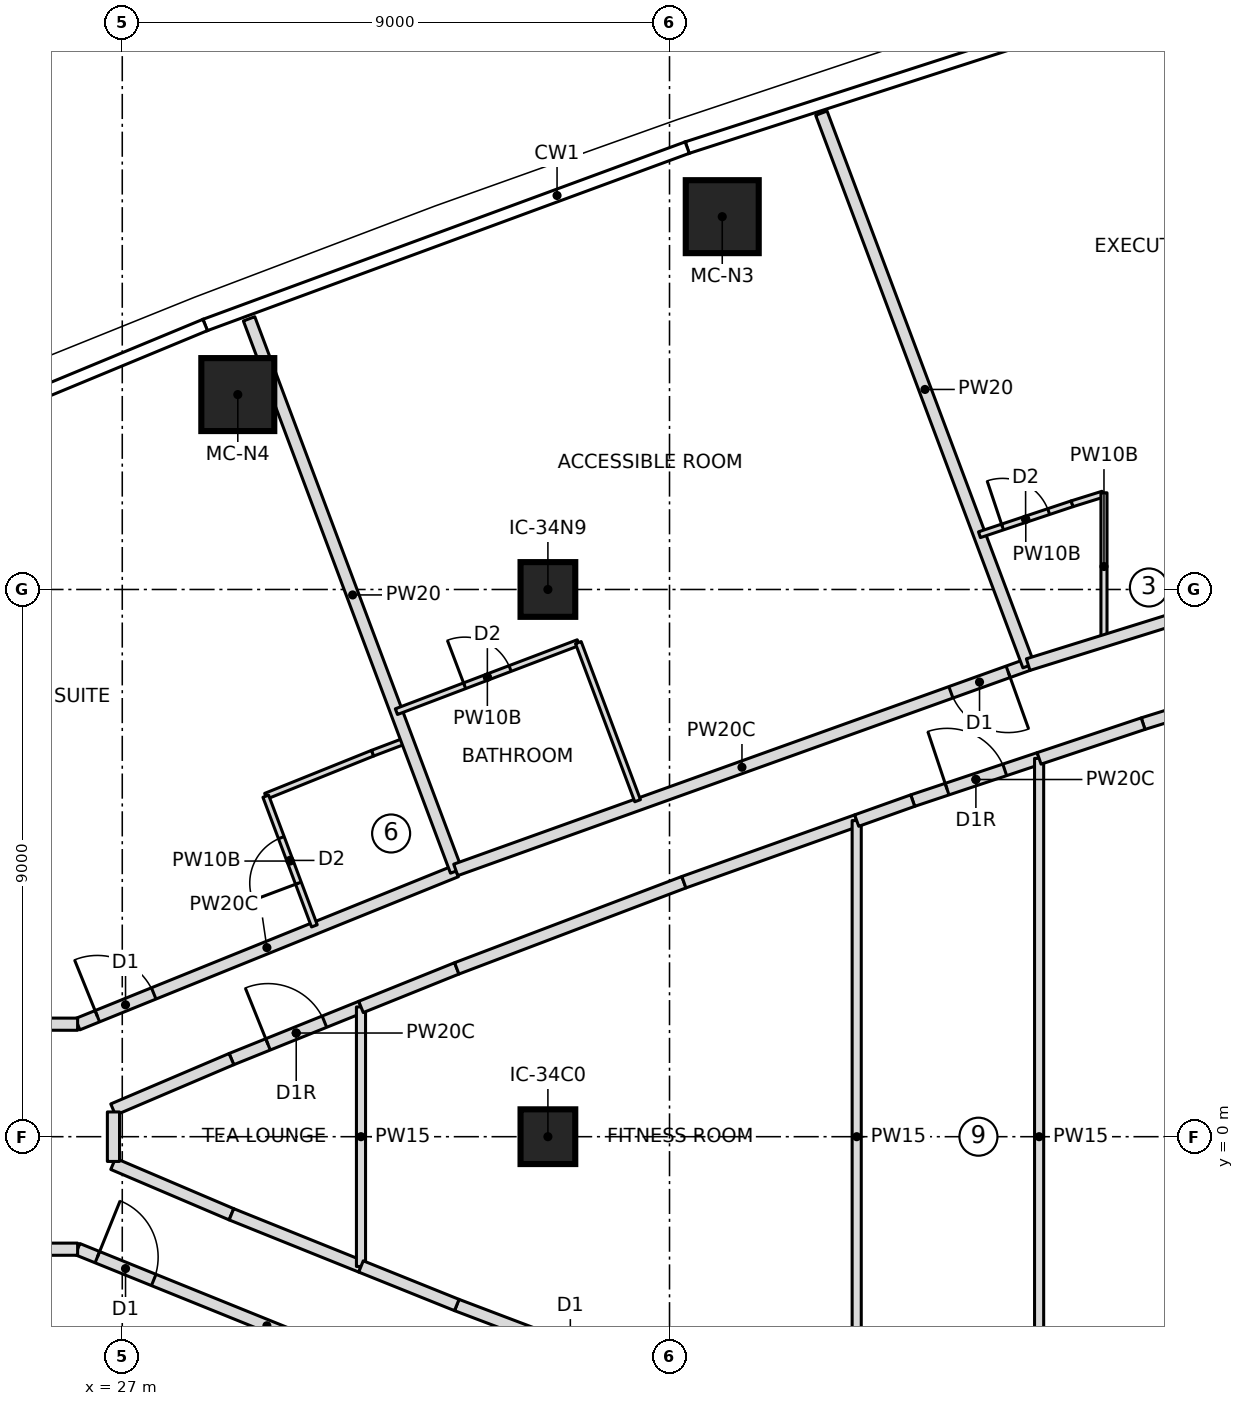
"""IFC4 building model, lengths in metres.
Left out: names, types, materials, properties, quantities, classifications, styles, units other than length and angle.
Written with IfcOpenShell. Run it as: python <this file> out.ifc"""

import sys

from ifc_helpers import new_model, si_unit, direction, frame, frame_2d, origin, origin_2d, place, context, subcontext, project, spatial, rectangle, extrude, element, fill, save


model = new_model("IFC4")
c1 = context("Model", 3, precision=1e-05, world=origin(), true_north=direction((0.0, 1.0)))
c2 = subcontext(c1, "Body", "Model", "MODEL_VIEW")
j1 = project(units=[si_unit("LENGTHUNIT", "METRE"), si_unit("PLANEANGLEUNIT", "RADIAN")], contexts=[c1])
p1 = place(None, origin())
s1 = spatial("IfcSite", under=j1, at=p1, CompositionType="ELEMENT")
p2 = place(p1, origin())
s2 = spatial("IfcBuilding", under=s1, at=p2, CompositionType="ELEMENT")
p3 = place(p2, frame((0.0, 0.0, 227.9)))
s3 = spatial("IfcBuildingStorey", under=s2, at=p3, CompositionType="ELEMENT", Elevation=227.9)
for number, where, z_axis, x_axis in (
    (1, (36.867, 15.132, 0.0), (0.0, 0.0, 1.0), (1.0, 0.0, 0.0)),
    (2, (28.9, 12.205, 0.0), (0.0, 0.0, 1.0), (1.0, 0.0, 0.0)),
):
    element("IfcColumn", number, at=place(p3, frame(where, z_axis=z_axis, x_axis=x_axis)), inside=s3, PredefinedType="COLUMN", context=c2, shape_type="SweptSolid", body=[
        extrude(rectangle(XDim=1.2, YDim=1.2, at=origin_2d()), origin(), (0.0, 0.0, 1.0), 3.55),
    ])
for number, where, z_axis, x_axis in (
    (3, (34.0, 0.0, 0.0), (0.0, 0.0, 1.0), (1.0, 0.0, 0.0)),
    (4, (34.0, 9.0, 0.0), (0.0, 0.0, 1.0), (1.0, 0.0, 0.0)),
):
    element("IfcColumn", number, at=place(p3, frame(where, z_axis=z_axis, x_axis=x_axis)), inside=s3, PredefinedType="COLUMN", context=c2, shape_type="SweptSolid", body=[
        extrude(rectangle(XDim=0.9, YDim=0.9, at=origin_2d()), origin(), (0.0, 0.0, 1.0), 3.55),
    ])
p4 = place(p3, frame((26.266, 1.85, 0.0), z_axis=(0.0, 0.0, 1.0), x_axis=(0.927007906702, 0.375041785555, 0.0)))
e5 = element("IfcWall", 5, at=p4, inside=s3, PredefinedType="PARTITIONING", context=c2, shape_type="SweptSolid", body=[
    extrude(rectangle(XDim=6.716, YDim=0.2, at=frame_2d((3.358, 0.0))), origin(), (0.0, 0.0, 1.0), 3.25),
])
p5 = place(p4, frame((0.35, 0.0, 0.0)))
e6 = element("IfcOpeningElement", 6, at=p5, cuts=e5, PredefinedType="OPENING", context=c2, shape_type="SweptSolid", body=[
    extrude(rectangle(XDim=1.0, YDim=2.1, at=frame_2d((0.5, 1.05))), frame((0.0, 0.11, 0.0), z_axis=(0.0, -1.0, 0.0), x_axis=(1.0, 0.0, 0.0)), (0.0, 0.0, 1.0), 0.22),
])
p6 = place(p3, frame((29.36, 5.6, 0.0), z_axis=(0.0, 0.0, 1.0), x_axis=(0.927594225674, 0.373589283166, 0.0)))
e7 = element("IfcWall", 7, at=p6, inside=s3, PredefinedType="PARTITIONING", context=c2, shape_type="SweptSolid", body=[
    extrude(rectangle(XDim=1.895, YDim=0.1, at=frame_2d((0.947, 0.0))), origin(), (0.0, 0.0, 1.0), 3.25),
])
p7 = place(p3, frame((31.117, 6.308, 0.0), z_axis=(0.0, 0.0, 1.0), x_axis=(0.935048188903, 0.354520640342, 0.0)))
e8 = element("IfcWall", 8, at=p7, inside=s3, PredefinedType="PARTITIONING", context=c2, shape_type="SweptSolid", body=[
    extrude(rectangle(XDim=0.606, YDim=0.1, at=frame_2d((0.303, 0.0))), origin(), (0.0, 0.0, 1.0), 3.25),
])
p8 = place(p3, frame((30.16, 3.467, 0.0), z_axis=(0.0, 0.0, 1.0), x_axis=(-0.351158682313, 0.936315961541, 0.0)))
e9 = element("IfcWall", 9, at=p8, inside=s3, PredefinedType="PARTITIONING", context=c2, shape_type="SweptSolid", body=[
    extrude(rectangle(XDim=2.278, YDim=0.1, at=frame_2d((1.139, 0.0))), origin(), (0.0, 0.0, 1.0), 3.25),
])
p9 = place(p8, frame((0.75, 0.0, 0.0)))
e10 = element("IfcOpeningElement", 10, at=p9, cuts=e9, PredefinedType="OPENING", context=c2, shape_type="SweptSolid", body=[
    extrude(rectangle(XDim=0.8, YDim=2.1, at=frame_2d((0.4, 1.05))), frame((0.0, 0.06, 0.0), z_axis=(0.0, -1.0, 0.0), x_axis=(1.0, 0.0, 0.0)), (0.0, 0.0, 1.0), 0.12),
])
p10 = place(p3, frame((32.492, 4.369, 0.0), z_axis=(0.0, 0.0, 1.0), x_axis=(-0.351128958016, 0.93632710889, 0.0)))
e11 = element("IfcWall", 11, at=p10, inside=s3, PredefinedType="PARTITIONING", context=c2, shape_type="SweptSolid", body=[
    extrude(rectangle(XDim=9.7, YDim=0.2, at=frame_2d((4.85, 0.0))), origin(), (0.0, 0.0, 1.0), 3.25),
])
p11 = place(p3, frame((41.898, 7.764, 0.0), z_axis=(0.0, 0.0, 1.0), x_axis=(-0.941277643829, -0.337633525034, 0.0)))
e12 = element("IfcWall", 12, at=p11, inside=s3, PredefinedType="PARTITIONING", context=c2, shape_type="SweptSolid", body=[
    extrude(rectangle(XDim=10.001, YDim=0.2, at=frame_2d((5.0, 0.0))), origin(), (0.0, 0.0, 1.0), 3.25),
])
p12 = place(p11, frame((0.35, 0.0, 0.0)))
e13 = element("IfcOpeningElement", 13, at=p12, cuts=e12, PredefinedType="OPENING", context=c2, shape_type="SweptSolid", body=[
    extrude(rectangle(XDim=1.0, YDim=2.1, at=frame_2d((0.5, 1.05))), frame((0.0, 0.11, 0.0), z_axis=(0.0, -1.0, 0.0), x_axis=(1.0, 0.0, 0.0)), (0.0, 0.0, 1.0), 0.22),
])
p13 = place(p3, frame((31.509, 6.991, 0.0), z_axis=(0.0, 0.0, 1.0), x_axis=(0.934948661714, 0.354783032232, 0.0)))
e14 = element("IfcWall", 14, at=p13, inside=s3, PredefinedType="PARTITIONING", context=c2, shape_type="SweptSolid", body=[
    extrude(rectangle(XDim=3.2, YDim=0.1, at=frame_2d((1.6, 0.0))), origin(), (0.0, 0.0, 1.0), 3.25),
])
p14 = place(p13, frame((1.2, 0.0, 0.0)))
e15 = element("IfcOpeningElement", 15, at=p14, cuts=e14, PredefinedType="OPENING", context=c2, shape_type="SweptSolid", body=[
    extrude(rectangle(XDim=0.8, YDim=2.1, at=frame_2d((0.4, 1.05))), frame((0.0, 0.06, 0.0), z_axis=(0.0, -1.0, 0.0), x_axis=(1.0, 0.0, 0.0)), (0.0, 0.0, 1.0), 0.12),
])
p15 = place(p3, frame((34.5, 8.126, 0.0), z_axis=(0.0, 0.0, 1.0), x_axis=(0.351065630332, -0.936350854755, 0.0)))
e16 = element("IfcWall", 16, at=p15, inside=s3, PredefinedType="PARTITIONING", context=c2, shape_type="SweptSolid", body=[
    extrude(rectangle(XDim=2.777, YDim=0.1, at=frame_2d((1.388, 0.0))), origin(), (0.0, 0.0, 1.0), 3.25),
])
p16 = place(p3, frame((41.906, 7.746, 0.0), z_axis=(0.0, 0.0, 1.0), x_axis=(-0.35112895446, 0.936327110224, 0.0)))
e17 = element("IfcWall", 17, at=p16, inside=s3, PredefinedType="PARTITIONING", context=c2, shape_type="SweptSolid", body=[
    extrude(rectangle(XDim=9.706, YDim=0.2, at=frame_2d((4.853, 0.0))), origin(), (0.0, 0.0, 1.0), 3.25),
])
p17 = place(p3, frame((41.097, 9.901, 0.0), z_axis=(0.0, 0.0, 1.0), x_axis=(0.948485479965, 0.3168206027, 0.0)))
e18 = element("IfcWall", 18, at=p17, inside=s3, PredefinedType="PARTITIONING", context=c2, shape_type="SweptSolid", body=[
    extrude(rectangle(XDim=1.606, YDim=0.1, at=frame_2d((0.803, 0.0))), origin(), (0.0, 0.0, 1.0), 3.25),
])
p18 = place(p17, frame((0.4, 0.0, 0.0)))
e19 = element("IfcOpeningElement", 19, at=p18, cuts=e18, PredefinedType="OPENING", context=c2, shape_type="SweptSolid", body=[
    extrude(rectangle(XDim=0.8, YDim=2.1, at=frame_2d((0.4, 1.05))), frame((0.0, 0.06, 0.0), z_axis=(0.0, -1.0, 0.0), x_axis=(1.0, 0.0, 0.0)), (0.0, 0.0, 1.0), 0.12),
])
p19 = place(p3, frame((42.621, 10.409, 0.0), z_axis=(0.0, 0.0, 1.0), x_axis=(0.954618903587, 0.297830067176, 0.0)))
e20 = element("IfcWall", 20, at=p19, inside=s3, PredefinedType="PARTITIONING", context=c2, shape_type="SweptSolid", body=[
    extrude(rectangle(XDim=0.531, YDim=0.1, at=frame_2d((0.266, 0.0))), origin(), (0.0, 0.0, 1.0), 3.25),
])
p20 = place(p3, frame((26.266, -1.85, 0.0), z_axis=(0.0, 0.0, 1.0), x_axis=(0.927007906702, -0.375041785555, 0.0)))
e21 = element("IfcWall", 21, at=p20, inside=s3, PredefinedType="PARTITIONING", context=c2, shape_type="SweptSolid", body=[
    extrude(rectangle(XDim=6.716, YDim=0.2, at=frame_2d((3.358, 0.0))), origin(), (0.0, 0.0, 1.0), 3.25),
])
p21 = place(p20, frame((0.35, 0.0, 0.0)))
e22 = element("IfcOpeningElement", 22, at=p21, cuts=e21, PredefinedType="OPENING", context=c2, shape_type="SweptSolid", body=[
    extrude(rectangle(XDim=1.0, YDim=2.1, at=frame_2d((0.5, 1.05))), frame((0.0, 0.11, 0.0), z_axis=(0.0, -1.0, 0.0), x_axis=(1.0, 0.0, 0.0)), (0.0, 0.0, 1.0), 0.22),
])
p22 = place(p3, frame((28.796, 1.276, 0.0), z_axis=(0.0, 0.0, 1.0), x_axis=(0.927609077038, 0.373552406224, 0.0)))
e23 = element("IfcWall", 23, at=p22, inside=s3, PredefinedType="PARTITIONING", context=c2, shape_type="SweptSolid", body=[
    extrude(rectangle(XDim=2.297, YDim=0.2, at=frame_2d((1.148, 0.0))), origin(), (0.0, 0.0, 1.0), 3.25),
])
p23 = place(p22, frame((0.648, 0.0, 0.0)))
e24 = element("IfcOpeningElement", 24, at=p23, cuts=e23, PredefinedType="OPENING", context=c2, shape_type="SweptSolid", body=[
    extrude(rectangle(XDim=1.0, YDim=2.1, at=frame_2d((0.5, 1.05))), frame((0.0, 0.11, 0.0), z_axis=(0.0, -1.0, 0.0), x_axis=(1.0, 0.0, 0.0)), (0.0, 0.0, 1.0), 0.22),
])
for number, where, z_axis, x_axis in (
    (25, (28.796, -1.276, 0.0), (0.0, 0.0, 1.0), (-0.92, 0.392, 0.0)),
    (26, (26.85, 0.447, 0.0), (0.0, 0.0, 1.0), (0.92, 0.392, 0.0)),
):
    element("IfcWall", number, at=place(p3, frame(where, z_axis=z_axis, x_axis=x_axis)), inside=s3, PredefinedType="PARTITIONING", context=c2, shape_type="SweptSolid", body=[
        extrude(rectangle(XDim=2.115, YDim=0.2, at=frame_2d((1.058, 0.0))), origin(), (0.0, 0.0, 1.0), 3.25),
    ])
p24 = place(p3, frame((30.926, -2.134, 0.0), z_axis=(0.0, 0.0, 1.0), x_axis=(-0.927609077038, 0.373552406224, 0.0)))
e27 = element("IfcWall", 27, at=p24, inside=s3, PredefinedType="PARTITIONING", context=c2, shape_type="SweptSolid", body=[
    extrude(rectangle(XDim=2.297, YDim=0.2, at=frame_2d((1.148, 0.0))), origin(), (0.0, 0.0, 1.0), 3.25),
])
p25 = place(p3, frame((30.926, -2.134, 0.0), z_axis=(0.0, 0.0, 1.0), x_axis=(0.0, 1.0, 0.0)))
e28 = element("IfcWall", 28, at=p25, inside=s3, PredefinedType="PARTITIONING", context=c2, shape_type="SweptSolid", body=[
    extrude(rectangle(XDim=4.268, YDim=0.15, at=frame_2d((2.134, 0.0))), origin(), (0.0, 0.0, 1.0), 3.25),
])
p26 = place(p3, frame((36.236, -4.186, 0.0), z_axis=(0.0, 0.0, 1.0), x_axis=(-0.934950696546, 0.354777669856, 0.0)))
e29 = element("IfcWall", 29, at=p26, inside=s3, PredefinedType="PARTITIONING", context=c2, shape_type="SweptSolid", body=[
    extrude(rectangle(XDim=3.995, YDim=0.2, at=frame_2d((1.997, 0.0))), origin(), (0.0, 0.0, 1.0), 3.25),
])
p27 = place(p26, frame((1.498, 0.0, 0.0)))
e30 = element("IfcOpeningElement", 30, at=p27, cuts=e29, PredefinedType="OPENING", context=c2, shape_type="SweptSolid", body=[
    extrude(rectangle(XDim=1.0, YDim=2.1, at=frame_2d((0.5, 1.05))), frame((0.0, 0.11, 0.0), z_axis=(0.0, -1.0, 0.0), x_axis=(1.0, 0.0, 0.0)), (0.0, 0.0, 1.0), 0.22),
])
for number, where, z_axis, x_axis in (
    (31, (32.501, -2.768, 0.0), (0.0, 0.0, 1.0), (-0.928, 0.373, 0.0)),
    (32, (30.926, 2.134, 0.0), (0.0, 0.0, 1.0), (0.928, 0.373, 0.0)),
):
    element("IfcWall", number, at=place(p3, frame(where, z_axis=z_axis, x_axis=x_axis)), inside=s3, PredefinedType="PARTITIONING", context=c2, shape_type="SweptSolid", body=[
        extrude(rectangle(XDim=1.698, YDim=0.2, at=frame_2d((0.849, 0.0))), origin(), (0.0, 0.0, 1.0), 3.25),
    ])
p28 = place(p3, frame((32.501, 2.768, 0.0), z_axis=(0.0, 0.0, 1.0), x_axis=(0.934950696546, 0.354777669856, 0.0)))
e33 = element("IfcWall", 33, at=p28, inside=s3, PredefinedType="PARTITIONING", context=c2, shape_type="SweptSolid", body=[
    extrude(rectangle(XDim=3.995, YDim=0.2, at=frame_2d((1.997, 0.0))), origin(), (0.0, 0.0, 1.0), 3.25),
])
p29 = place(p3, frame((36.236, 4.186, 0.0), z_axis=(0.0, 0.0, 1.0), x_axis=(0.941908381697, 0.335869916023, 0.0)))
e34 = element("IfcWall", 34, at=p29, inside=s3, PredefinedType="PARTITIONING", context=c2, shape_type="SweptSolid", body=[
    extrude(rectangle(XDim=3.017, YDim=0.2, at=frame_2d((1.509, 0.0))), origin(), (0.0, 0.0, 1.0), 3.25),
])
p30 = place(p3, frame((39.078, -5.199, 0.0), z_axis=(0.0, 0.0, 1.0), x_axis=(0.0, 1.0, 0.0)))
e35 = element("IfcWall", 35, at=p30, inside=s3, PredefinedType="PARTITIONING", context=c2, shape_type="SweptSolid", body=[
    extrude(rectangle(XDim=10.398, YDim=0.15, at=frame_2d((5.199, 0.0))), origin(), (0.0, 0.0, 1.0), 3.25),
])
p31 = place(p3, frame((39.999, 5.527, 0.0), z_axis=(0.0, 0.0, 1.0), x_axis=(0.9484714727, 0.316862534034, 0.0)))
e36 = element("IfcWall", 36, at=p31, inside=s3, PredefinedType="PARTITIONING", context=c2, shape_type="SweptSolid", body=[
    extrude(rectangle(XDim=2.192, YDim=0.2, at=frame_2d((1.096, 0.0))), origin(), (0.0, 0.0, 1.0), 3.25),
])
p32 = place(p31, frame((0.596, 0.0, 0.0)))
e37 = element("IfcOpeningElement", 37, at=p32, cuts=e36, PredefinedType="OPENING", context=c2, shape_type="SweptSolid", body=[
    extrude(rectangle(XDim=1.0, YDim=2.1, at=frame_2d((0.5, 1.05))), frame((0.0, 0.11, 0.0), z_axis=(0.0, -1.0, 0.0), x_axis=(1.0, 0.0, 0.0)), (0.0, 0.0, 1.0), 0.22),
])
p33 = place(p3, frame((39.078, 5.199, 0.0), z_axis=(0.0, 0.0, 1.0), x_axis=(0.941911279377, 0.335861789704, 0.0)))
e38 = element("IfcWall", 38, at=p33, inside=s3, PredefinedType="PARTITIONING", context=c2, shape_type="SweptSolid", body=[
    extrude(rectangle(XDim=0.978, YDim=0.2, at=frame_2d((0.489, 0.0))), origin(), (0.0, 0.0, 1.0), 3.25),
])
p34 = place(p3, frame((42.078, -6.222, 0.0), z_axis=(0.0, 0.0, 1.0), x_axis=(0.0, 1.0, 0.0)))
e39 = element("IfcWall", 39, at=p34, inside=s3, PredefinedType="PARTITIONING", context=c2, shape_type="SweptSolid", body=[
    extrude(rectangle(XDim=12.444, YDim=0.15, at=frame_2d((6.222, 0.0))), origin(), (0.0, 0.0, 1.0), 3.25),
])
p35 = place(p3, frame((43.788, 6.793, 0.0), z_axis=(0.0, 0.0, 1.0), x_axis=(0.954693570678, 0.29759063511, 0.0)))
e40 = element("IfcWall", 40, at=p35, inside=s3, PredefinedType="PARTITIONING", context=c2, shape_type="SweptSolid", body=[
    extrude(rectangle(XDim=1.198, YDim=0.2, at=frame_2d((0.599, 0.0))), origin(), (0.0, 0.0, 1.0), 3.25),
])
p36 = place(p3, frame((42.078, 6.222, 0.0), z_axis=(0.0, 0.0, 1.0), x_axis=(0.948466406859, 0.316877697323, 0.0)))
e41 = element("IfcWall", 41, at=p36, inside=s3, PredefinedType="PARTITIONING", context=c2, shape_type="SweptSolid", body=[
    extrude(rectangle(XDim=1.803, YDim=0.2, at=frame_2d((0.901, 0.0))), origin(), (0.0, 0.0, 1.0), 3.25),
])
p37 = place(p3, frame((43.145, 10.59, 0.0), z_axis=(0.0, 0.0, 1.0), x_axis=(0.0, -1.0, 0.0)))
e42 = element("IfcWall", 42, at=p37, inside=s3, PredefinedType="PARTITIONING", context=c2, shape_type="SweptSolid", body=[
    extrude(rectangle(XDim=2.425, YDim=0.1, at=frame_2d((1.213, 0.0))), origin(), (0.0, 0.0, 1.0), 3.25),
])
p38 = place(p3, frame((41.898, 7.764, 0.0), z_axis=(0.0, 0.0, 1.0), x_axis=(0.954667015156, 0.297675813886, 0.0)))
e43 = element("IfcWall", 43, at=p38, inside=s3, PredefinedType="PARTITIONING", context=c2, shape_type="SweptSolid", body=[
    extrude(rectangle(XDim=6.706, YDim=0.2, at=frame_2d((3.353, 0.0))), origin(), (0.0, 0.0, 1.0), 3.25),
])
p39 = place(p38, frame((3.95, 0.0, 0.0)))
e44 = element("IfcOpeningElement", 44, at=p39, cuts=e43, PredefinedType="OPENING", context=c2, shape_type="SweptSolid", body=[
    extrude(rectangle(XDim=1.5, YDim=2.1, at=frame_2d((0.75, 1.05))), frame((0.0, 0.11, 0.0), z_axis=(0.0, -1.0, 0.0), x_axis=(1.0, 0.0, 0.0)), (0.0, 0.0, 1.0), 0.22),
])
p40 = place(p3, frame((26.855, -0.407, 0.0), z_axis=(0.0, 0.0, 1.0), x_axis=(0.0, 1.0, 0.0)))
e45 = element("IfcWall", 45, at=p40, inside=s3, PredefinedType="PARTITIONING", context=c2, shape_type="SweptSolid", body=[
    extrude(rectangle(XDim=0.814, YDim=0.2, at=frame_2d((0.407, 0.0))), origin(), (0.0, 0.0, 1.0), 3.25),
])
p41 = place(p3, frame((26.266, 1.85, 0.0), z_axis=(0.0, 0.0, 1.0), x_axis=(-0.999998892962, 0.001487977051, 0.0)))
e46 = element("IfcWall", 46, at=p41, inside=s3, PredefinedType="PARTITIONING", context=c2, shape_type="SweptSolid", body=[
    extrude(rectangle(XDim=3.117, YDim=0.2, at=frame_2d((1.559, 0.0))), origin(), (0.0, 0.0, 1.0), 3.25),
])
p42 = place(p3, frame((23.148, -1.854, 0.0), z_axis=(0.0, 0.0, 1.0), x_axis=(0.999999006581, 0.001409552241, 0.0)))
e47 = element("IfcWall", 47, at=p42, inside=s3, PredefinedType="PARTITIONING", context=c2, shape_type="SweptSolid", body=[
    extrude(rectangle(XDim=3.118, YDim=0.2, at=frame_2d((1.559, 0.0))), origin(), (0.0, 0.0, 1.0), 3.25),
])
p43 = place(p9, origin())
e48 = element("IfcDoor", 48, at=p43, inside=s3, OperationType="SINGLE_SWING_LEFT", PredefinedType="DOOR", context=c2, shape_type="SweptSolid", body=[
    extrude(rectangle(XDim=0.8, YDim=2.1, at=frame_2d((0.4, 1.05))), frame((0.0, 0.025, 0.0), z_axis=(0.0, -1.0, 0.0), x_axis=(1.0, 0.0, 0.0)), (0.0, 0.0, 1.0), 0.05),
])
fill(e10, e48)
p44 = place(p5, origin())
e49 = element("IfcDoor", 49, at=p44, inside=s3, OperationType="SINGLE_SWING_LEFT", PredefinedType="DOOR", context=c2, shape_type="SweptSolid", body=[
    extrude(rectangle(XDim=1.0, YDim=2.1, at=frame_2d((0.5, 1.05))), frame((0.0, 0.025, 0.0), z_axis=(0.0, -1.0, 0.0), x_axis=(1.0, 0.0, 0.0)), (0.0, 0.0, 1.0), 0.05),
])
fill(e6, e49)
p45 = place(p14, origin())
e50 = element("IfcDoor", 50, at=p45, inside=s3, OperationType="SINGLE_SWING_LEFT", PredefinedType="DOOR", context=c2, shape_type="SweptSolid", body=[
    extrude(rectangle(XDim=0.8, YDim=2.1, at=frame_2d((0.4, 1.05))), frame((0.0, 0.025, 0.0), z_axis=(0.0, -1.0, 0.0), x_axis=(1.0, 0.0, 0.0)), (0.0, 0.0, 1.0), 0.05),
])
fill(e15, e50)
p46 = place(p12, origin())
e51 = element("IfcDoor", 51, at=p46, inside=s3, OperationType="SINGLE_SWING_LEFT", PredefinedType="DOOR", context=c2, shape_type="SweptSolid", body=[
    extrude(rectangle(XDim=1.0, YDim=2.1, at=frame_2d((0.5, 1.05))), frame((0.0, 0.025, 0.0), z_axis=(0.0, -1.0, 0.0), x_axis=(1.0, 0.0, 0.0)), (0.0, 0.0, 1.0), 0.05),
])
fill(e13, e51)
p47 = place(p18, origin())
e52 = element("IfcDoor", 52, at=p47, inside=s3, OperationType="SINGLE_SWING_LEFT", PredefinedType="DOOR", context=c2, shape_type="SweptSolid", body=[
    extrude(rectangle(XDim=0.8, YDim=2.1, at=frame_2d((0.4, 1.05))), frame((0.0, 0.025, 0.0), z_axis=(0.0, -1.0, 0.0), x_axis=(1.0, 0.0, 0.0)), (0.0, 0.0, 1.0), 0.05),
])
fill(e19, e52)
p48 = place(p21, origin())
e53 = element("IfcDoor", 53, at=p48, inside=s3, OperationType="SINGLE_SWING_LEFT", PredefinedType="DOOR", context=c2, shape_type="SweptSolid", body=[
    extrude(rectangle(XDim=1.0, YDim=2.1, at=frame_2d((0.5, 1.05))), frame((0.0, 0.025, 0.0), z_axis=(0.0, -1.0, 0.0), x_axis=(1.0, 0.0, 0.0)), (0.0, 0.0, 1.0), 0.05),
])
fill(e22, e53)
p49 = place(p23, origin())
e54 = element("IfcDoor", 54, at=p49, inside=s3, OperationType="SINGLE_SWING_RIGHT", PredefinedType="DOOR", context=c2, shape_type="SweptSolid", body=[
    extrude(rectangle(XDim=1.0, YDim=2.1, at=frame_2d((0.5, 1.05))), frame((0.0, 0.025, 0.0), z_axis=(0.0, -1.0, 0.0), x_axis=(1.0, 0.0, 0.0)), (0.0, 0.0, 1.0), 0.05),
])
fill(e24, e54)
p50 = place(p32, origin())
e55 = element("IfcDoor", 55, at=p50, inside=s3, OperationType="SINGLE_SWING_RIGHT", PredefinedType="DOOR", context=c2, shape_type="SweptSolid", body=[
    extrude(rectangle(XDim=1.0, YDim=2.1, at=frame_2d((0.5, 1.05))), frame((0.0, 0.025, 0.0), z_axis=(0.0, -1.0, 0.0), x_axis=(1.0, 0.0, 0.0)), (0.0, 0.0, 1.0), 0.05),
])
fill(e37, e55)
save(model, sys.argv[1])
